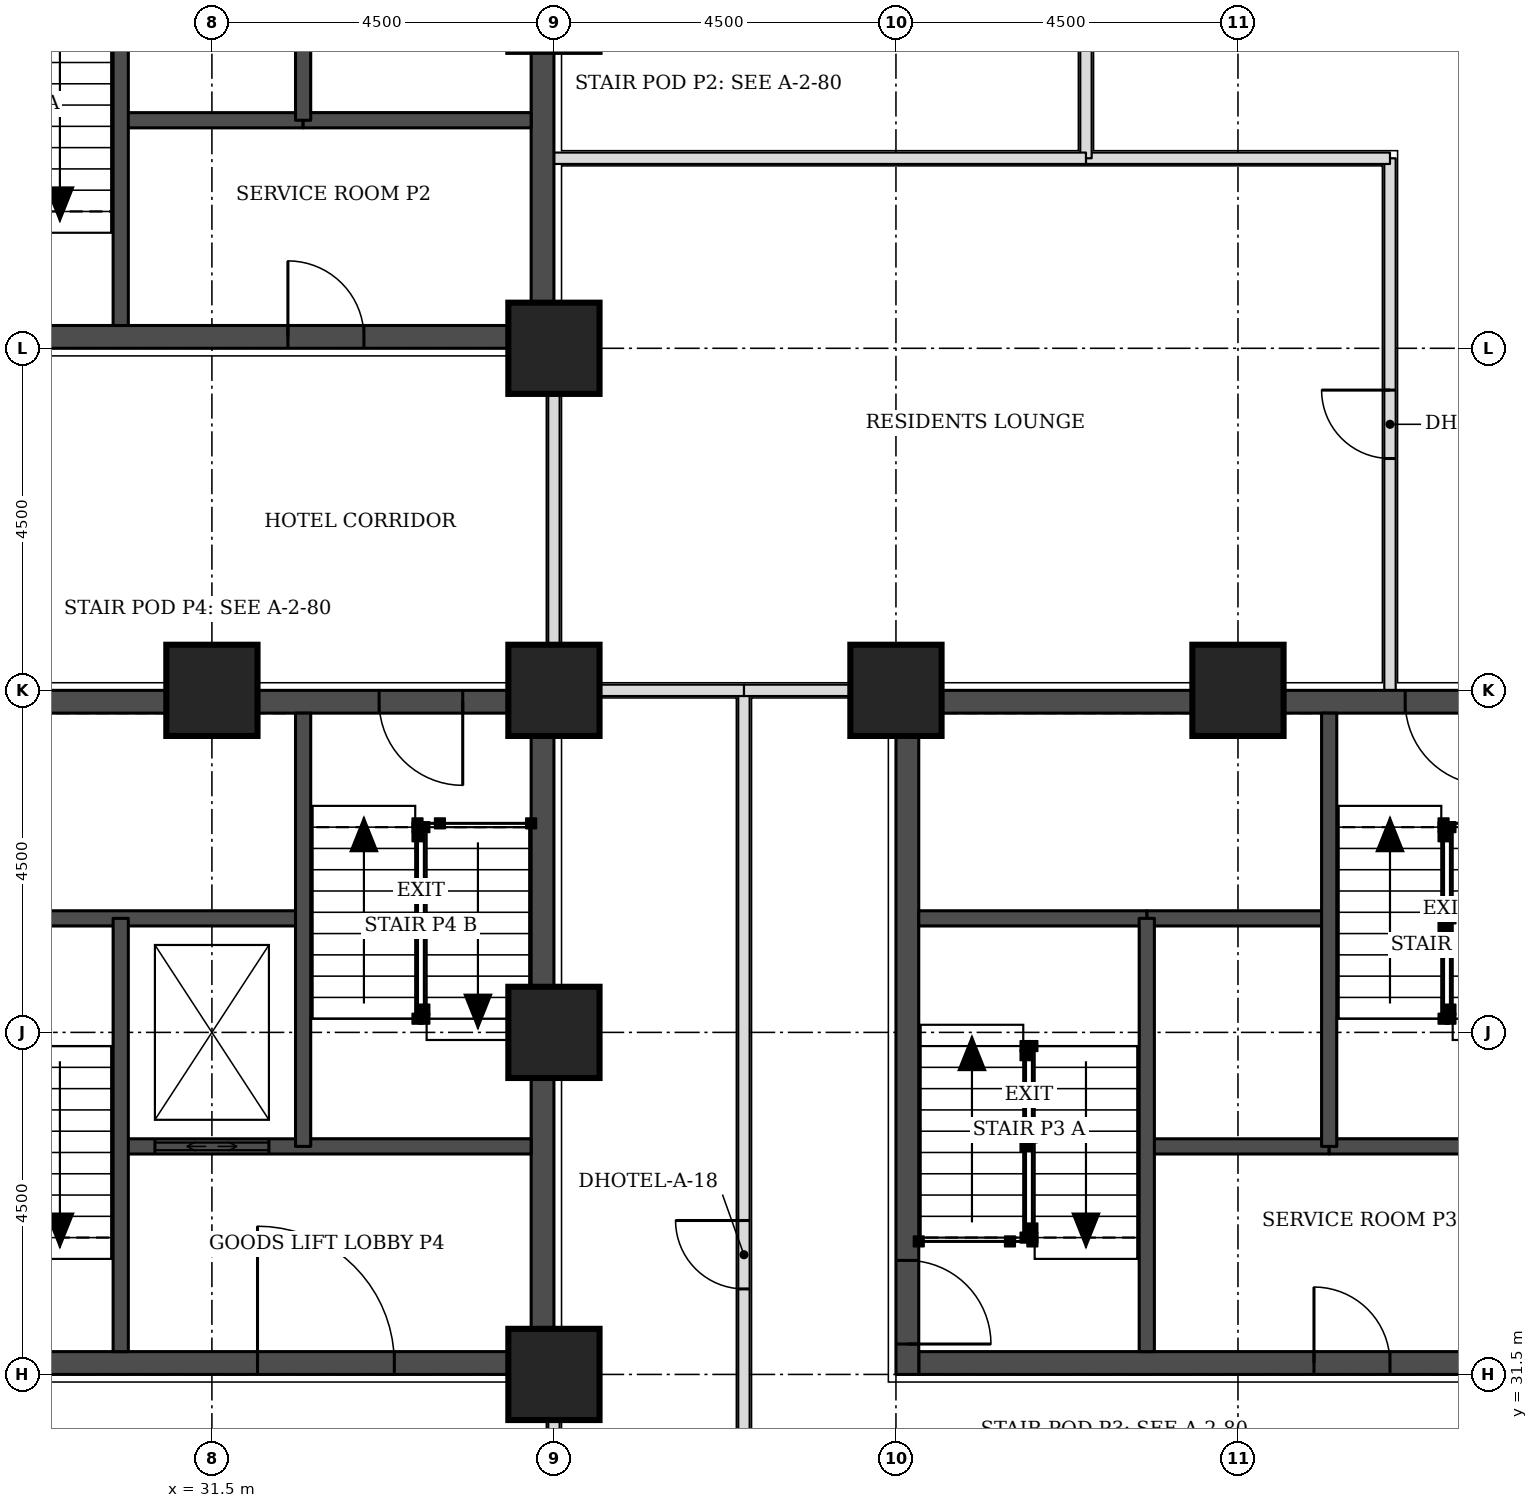
"""IFC4 building model, lengths in metres.
Left out: names, types, materials, properties, quantities, classifications, styles, units other than length and angle.
Written with IfcOpenShell. Run it as: python <this file> out.ifc"""

import sys

from ifc_helpers import new_model, si_unit, direction, frame, frame_2d, origin, origin_2d, place, context, subcontext, project, spatial, rectangle, extrude, element, fill, save


model = new_model("IFC4")
c1 = context("Model", 3, precision=1e-05, world=origin(), true_north=direction((0.0, 1.0)))
c2 = subcontext(c1, "Body", "Model", "MODEL_VIEW")
j1 = project(units=[si_unit("LENGTHUNIT", "METRE"), si_unit("PLANEANGLEUNIT", "RADIAN")], contexts=[c1])
p1 = place(None, origin())
s1 = spatial("IfcSite", under=j1, at=p1, CompositionType="ELEMENT")
p2 = place(p1, origin())
s2 = spatial("IfcBuilding", under=s1, at=p2, CompositionType="ELEMENT")
p3 = place(p2, frame((0.0, 0.0, 49.5)))
s3 = spatial("IfcBuildingStorey", under=s2, at=p3, CompositionType="ELEMENT", Elevation=49.5)
for number, where, z_axis, x_axis in (
    (1, (36.0, 31.5, 0.0), (0.0, 0.0, 1.0), (1.0, 0.0, 0.0)),
    (2, (36.0, 36.0, 0.0), (0.0, 0.0, 1.0), (1.0, 0.0, 0.0)),
    (3, (31.5, 40.5, 0.0), (0.0, 0.0, 1.0), (1.0, 0.0, 0.0)),
    (4, (36.0, 40.5, 0.0), (0.0, 0.0, 1.0), (1.0, 0.0, 0.0)),
    (5, (40.5, 40.5, 0.0), (0.0, 0.0, 1.0), (1.0, 0.0, 0.0)),
    (6, (45.0, 40.5, 0.0), (0.0, 0.0, 1.0), (1.0, 0.0, 0.0)),
    (7, (36.0, 45.0, 0.0), (0.0, 0.0, 1.0), (1.0, 0.0, 0.0)),
):
    element("IfcColumn", number, at=place(p3, frame(where, z_axis=z_axis, x_axis=x_axis)), inside=s3, PredefinedType="COLUMN", context=c2, shape_type="SweptSolid", body=[
        extrude(rectangle(XDim=1.2, YDim=1.2, at=origin_2d()), origin(), (0.0, 0.0, 1.0), 3.3),
    ])
p4 = place(p3, frame((27.3, 45.15, 0.0), z_axis=(0.0, 0.0, 1.0), x_axis=(1.0, 0.0, 0.0)))
e8 = element("IfcWall", 8, at=p4, inside=s3, PredefinedType="SHEAR", context=c2, shape_type="SweptSolid", body=[
    extrude(rectangle(XDim=8.4, YDim=0.3, at=frame_2d((4.2, 0.0))), origin(), (0.0, 0.0, 1.0), 3.3),
])
p5 = place(p4, frame((5.2, 0.0, 0.0)))
e9 = element("IfcOpeningElement", 9, at=p5, cuts=e8, PredefinedType="OPENING", context=c2, shape_type="SweptSolid", body=[
    extrude(rectangle(XDim=1.0, YDim=2.1, at=frame_2d((0.5, 1.05))), frame((0.0, 0.16, 0.0), z_axis=(0.0, -1.0, 0.0), x_axis=(1.0, 0.0, 0.0)), (0.0, 0.0, 1.0), 0.32),
])
p6 = place(p3, frame((35.85, 45.0, 0.0), z_axis=(0.0, 0.0, 1.0), x_axis=(0.0, 1.0, 0.0)))
e10 = element("IfcWall", 10, at=p6, inside=s3, PredefinedType="SHEAR", context=c2, shape_type="SweptSolid", body=[
    extrude(rectangle(XDim=9.0, YDim=0.3, at=frame_2d((4.5, 0.0))), origin(), (0.0, 0.0, 1.0), 3.3),
])
p7 = place(p3, frame((40.8, 31.65, 0.0), z_axis=(0.0, 0.0, 1.0), x_axis=(1.0, 0.0, 0.0)))
e11 = element("IfcWall", 11, at=p7, inside=s3, PredefinedType="SHEAR", context=c2, shape_type="SweptSolid", body=[
    extrude(rectangle(XDim=8.4, YDim=0.3, at=frame_2d((4.2, 0.0))), origin(), (0.0, 0.0, 1.0), 3.3),
])
p8 = place(p7, frame((5.2, 0.0, 0.0)))
e12 = element("IfcOpeningElement", 12, at=p8, cuts=e11, PredefinedType="OPENING", context=c2, shape_type="SweptSolid", body=[
    extrude(rectangle(XDim=1.0, YDim=2.1, at=frame_2d((0.5, 1.05))), frame((0.0, 0.16, 0.0), z_axis=(0.0, -1.0, 0.0), x_axis=(1.0, 0.0, 0.0)), (0.0, 0.0, 1.0), 0.32),
])
p9 = place(p3, frame((40.8, 40.35, 0.0), z_axis=(0.0, 0.0, 1.0), x_axis=(1.0, 0.0, 0.0)))
e13 = element("IfcWall", 13, at=p9, inside=s3, PredefinedType="SHEAR", context=c2, shape_type="SweptSolid", body=[
    extrude(rectangle(XDim=8.4, YDim=0.3, at=frame_2d((4.2, 0.0))), origin(), (0.0, 0.0, 1.0), 3.3),
])
p10 = place(p9, frame((6.4, 0.0, 0.0)))
e14 = element("IfcOpeningElement", 14, at=p10, cuts=e13, PredefinedType="OPENING", context=c2, shape_type="SweptSolid", body=[
    extrude(rectangle(XDim=1.1, YDim=2.1, at=frame_2d((0.55, 1.05))), frame((0.0, 0.16, 0.0), z_axis=(0.0, -1.0, 0.0), x_axis=(1.0, 0.0, 0.0)), (0.0, 0.0, 1.0), 0.32),
])
p11 = place(p3, frame((40.65, 31.5, 0.0), z_axis=(0.0, 0.0, 1.0), x_axis=(0.0, 1.0, 0.0)))
e15 = element("IfcWall", 15, at=p11, inside=s3, PredefinedType="SHEAR", context=c2, shape_type="SweptSolid", body=[
    extrude(rectangle(XDim=9.0, YDim=0.3, at=frame_2d((4.5, 0.0))), origin(), (0.0, 0.0, 1.0), 3.3),
])
p12 = place(p11, frame((0.4, 0.0, 0.0)))
e16 = element("IfcOpeningElement", 16, at=p12, cuts=e15, PredefinedType="OPENING", context=c2, shape_type="SweptSolid", body=[
    extrude(rectangle(XDim=1.1, YDim=2.1, at=frame_2d((0.55, 1.05))), frame((0.0, 0.16, 0.0), z_axis=(0.0, -1.0, 0.0), x_axis=(1.0, 0.0, 0.0)), (0.0, 0.0, 1.0), 0.32),
])
p13 = place(p3, frame((27.3, 31.65, 0.0), z_axis=(0.0, 0.0, 1.0), x_axis=(1.0, 0.0, 0.0)))
e17 = element("IfcWall", 17, at=p13, inside=s3, PredefinedType="SHEAR", context=c2, shape_type="SweptSolid", body=[
    extrude(rectangle(XDim=8.4, YDim=0.3, at=frame_2d((4.2, 0.0))), origin(), (0.0, 0.0, 1.0), 3.3),
])
p14 = place(p13, frame((4.8, 0.0, 0.0)))
e18 = element("IfcOpeningElement", 18, at=p14, cuts=e17, PredefinedType="OPENING", context=c2, shape_type="SweptSolid", body=[
    extrude(rectangle(XDim=1.8, YDim=2.1, at=frame_2d((0.9, 1.05))), frame((0.0, 0.16, 0.0), z_axis=(0.0, -1.0, 0.0), x_axis=(1.0, 0.0, 0.0)), (0.0, 0.0, 1.0), 0.32),
])
p15 = place(p3, frame((27.3, 40.35, 0.0), z_axis=(0.0, 0.0, 1.0), x_axis=(1.0, 0.0, 0.0)))
e19 = element("IfcWall", 19, at=p15, inside=s3, PredefinedType="SHEAR", context=c2, shape_type="SweptSolid", body=[
    extrude(rectangle(XDim=8.4, YDim=0.3, at=frame_2d((4.2, 0.0))), origin(), (0.0, 0.0, 1.0), 3.3),
])
p16 = place(p15, frame((6.4, 0.0, 0.0)))
e20 = element("IfcOpeningElement", 20, at=p16, cuts=e19, PredefinedType="OPENING", context=c2, shape_type="SweptSolid", body=[
    extrude(rectangle(XDim=1.1, YDim=2.1, at=frame_2d((0.55, 1.05))), frame((0.0, 0.16, 0.0), z_axis=(0.0, -1.0, 0.0), x_axis=(1.0, 0.0, 0.0)), (0.0, 0.0, 1.0), 0.32),
])
p17 = place(p3, frame((35.85, 31.5, 0.0), z_axis=(0.0, 0.0, 1.0), x_axis=(0.0, 1.0, 0.0)))
e21 = element("IfcWall", 21, at=p17, inside=s3, PredefinedType="SHEAR", context=c2, shape_type="SweptSolid", body=[
    extrude(rectangle(XDim=9.0, YDim=0.3, at=frame_2d((4.5, 0.0))), origin(), (0.0, 0.0, 1.0), 3.3),
])
p18 = place(p3, frame((38.5, 25.65, 0.0), z_axis=(0.0, 0.0, 1.0), x_axis=(0.0, 1.0, 0.0)))
e22 = element("IfcWall", 22, at=p18, inside=s3, PredefinedType="PARTITIONING", context=c2, shape_type="SweptSolid", body=[
    extrude(rectangle(XDim=14.85, YDim=0.15, at=frame_2d((7.425, 0.0))), origin(), (0.0, 0.0, 1.0), 3.08),
])
p19 = place(p18, frame((6.975, 0.0, 0.0)))
e23 = element("IfcOpeningElement", 23, at=p19, cuts=e22, PredefinedType="OPENING", context=c2, shape_type="SweptSolid", body=[
    extrude(rectangle(XDim=0.9, YDim=2.1, at=frame_2d((0.45, 1.05))), frame((0.0, 0.085, 0.0), z_axis=(0.0, -1.0, 0.0), x_axis=(1.0, 0.0, 0.0)), (0.0, 0.0, 1.0), 0.17),
])
for number, where, z_axis, x_axis in (
    (24, (36.0, 29.5, 0.0), (0.0, 0.0, 1.0), (0.0, 1.0, 0.0)),
    (25, (38.5, 40.5, 0.0), (0.0, 0.0, 1.0), (1.0, 0.0, 0.0)),
):
    element("IfcWall", number, at=place(p3, frame(where, z_axis=z_axis, x_axis=x_axis)), inside=s3, PredefinedType="PARTITIONING", context=c2, shape_type="SweptSolid", body=[
        extrude(rectangle(XDim=1.95, YDim=0.15, at=frame_2d((0.975, 0.0))), origin(), (0.0, 0.0, 1.0), 2.33),
    ])
p20 = place(p3, frame((36.0, 40.55, 0.0), z_axis=(0.0, 0.0, 1.0), x_axis=(0.0, 1.0, 0.0)))
e26 = element("IfcWall", 26, at=p20, inside=s3, PredefinedType="PARTITIONING", context=c2, shape_type="SweptSolid", body=[
    extrude(rectangle(XDim=4.4, YDim=0.15, at=frame_2d((2.2, 0.0))), origin(), (0.0, 0.0, 1.0), 2.33),
])
p21 = place(p3, frame((47.0, 40.5, 0.0), z_axis=(0.0, 0.0, 1.0), x_axis=(0.0, 1.0, 0.0)))
e27 = element("IfcWall", 27, at=p21, inside=s3, PredefinedType="PARTITIONING", context=c2, shape_type="SweptSolid", body=[
    extrude(rectangle(XDim=7.0, YDim=0.15, at=frame_2d((3.5, 0.0))), origin(), (0.0, 0.0, 1.0), 3.08),
])
p22 = place(p21, frame((3.05, 0.0, 0.0)))
e28 = element("IfcOpeningElement", 28, at=p22, cuts=e27, PredefinedType="OPENING", context=c2, shape_type="SweptSolid", body=[
    extrude(rectangle(XDim=0.9, YDim=2.1, at=frame_2d((0.45, 1.05))), frame((0.0, 0.085, 0.0), z_axis=(0.0, -1.0, 0.0), x_axis=(1.0, 0.0, 0.0)), (0.0, 0.0, 1.0), 0.17),
])
p23 = place(p3, frame((43.0, 47.5, 0.0), z_axis=(0.0, 0.0, 1.0), x_axis=(1.0, 0.0, 0.0)))
e29 = element("IfcWall", 29, at=p23, inside=s3, PredefinedType="PARTITIONING", context=c2, shape_type="SweptSolid", body=[
    extrude(rectangle(XDim=4.0, YDim=0.15, at=frame_2d((2.0, 0.0))), origin(), (0.0, 0.0, 1.0), 3.08),
])
p24 = place(p3, frame((43.0, 47.5, 0.0), z_axis=(0.0, 0.0, 1.0), x_axis=(0.0, 1.0, 0.0)))
e30 = element("IfcWall", 30, at=p24, inside=s3, PredefinedType="PARTITIONING", context=c2, shape_type="SweptSolid", body=[
    extrude(rectangle(XDim=6.5, YDim=0.15, at=frame_2d((3.25, 0.0))), origin(), (0.0, 0.0, 1.0), 3.08),
])
p25 = place(p3, frame((36.05, 40.5, 0.0), z_axis=(0.0, 0.0, 1.0), x_axis=(1.0, 0.0, 0.0)))
e31 = element("IfcWall", 31, at=p25, inside=s3, PredefinedType="PARTITIONING", context=c2, shape_type="SweptSolid", body=[
    extrude(rectangle(XDim=2.45, YDim=0.15, at=frame_2d((1.225, 0.0))), origin(), (0.0, 0.0, 1.0), 2.33),
])
p26 = place(p3, frame((36.0, 47.5, 0.0), z_axis=(0.0, 0.0, 1.0), x_axis=(1.0, 0.0, 0.0)))
e32 = element("IfcWall", 32, at=p26, inside=s3, PredefinedType="PARTITIONING", context=c2, shape_type="SweptSolid", body=[
    extrude(rectangle(XDim=7.0, YDim=0.15, at=frame_2d((3.5, 0.0))), origin(), (0.0, 0.0, 1.0), 3.08),
])
p27 = place(p3, frame((30.3, 48.0, 0.0), z_axis=(0.0, 0.0, 1.0), x_axis=(1.0, 0.0, 0.0)))
e33 = element("IfcWall", 33, at=p27, inside=s3, PredefinedType="SOLIDWALL", context=c2, shape_type="SweptSolid", body=[
    extrude(rectangle(XDim=2.4, YDim=0.2, at=frame_2d((1.2, 0.0))), origin(), (0.0, 0.0, 1.0), 3.08),
])
p28 = place(p3, frame((32.7, 48.0, 0.0), z_axis=(0.0, 0.0, 1.0), x_axis=(1.0, 0.0, 0.0)))
e34 = element("IfcWall", 34, at=p28, inside=s3, PredefinedType="SOLIDWALL", context=c2, shape_type="SweptSolid", body=[
    extrude(rectangle(XDim=3.0, YDim=0.2, at=frame_2d((1.5, 0.0))), origin(), (0.0, 0.0, 1.0), 3.08),
])
for number, where, z_axis, x_axis in (
    (35, (30.3, 45.3, 0.0), (0.0, 0.0, 1.0), (0.0, 1.0, 0.0)),
    (36, (32.7, 48.0, 0.0), (0.0, 0.0, 1.0), (0.0, 1.0, 0.0)),
):
    element("IfcWall", number, at=place(p3, frame(where, z_axis=z_axis, x_axis=x_axis)), inside=s3, PredefinedType="SOLIDWALL", context=c2, shape_type="SweptSolid", body=[
        extrude(rectangle(XDim=5.7, YDim=0.2, at=frame_2d((2.85, 0.0))), origin(), (0.0, 0.0, 1.0), 3.08),
    ])
p29 = place(p3, frame((43.8, 34.5, 0.0), z_axis=(0.0, 0.0, 1.0), x_axis=(1.0, 0.0, 0.0)))
e37 = element("IfcWall", 37, at=p29, inside=s3, PredefinedType="SOLIDWALL", context=c2, shape_type="SweptSolid", body=[
    extrude(rectangle(XDim=2.4, YDim=0.2, at=frame_2d((1.2, 0.0))), origin(), (0.0, 0.0, 1.0), 3.08),
])
p30 = place(p3, frame((46.2, 34.5, 0.0), z_axis=(0.0, 0.0, 1.0), x_axis=(1.0, 0.0, 0.0)))
e38 = element("IfcWall", 38, at=p30, inside=s3, PredefinedType="SOLIDWALL", context=c2, shape_type="SweptSolid", body=[
    extrude(rectangle(XDim=3.0, YDim=0.2, at=frame_2d((1.5, 0.0))), origin(), (0.0, 0.0, 1.0), 3.08),
])
p31 = place(p3, frame((43.8, 37.5, 0.0), z_axis=(0.0, 0.0, 1.0), x_axis=(1.0, 0.0, 0.0)))
e39 = element("IfcWall", 39, at=p31, inside=s3, PredefinedType="SOLIDWALL", context=c2, shape_type="SweptSolid", body=[
    extrude(rectangle(XDim=2.4, YDim=0.2, at=frame_2d((1.2, 0.0))), origin(), (0.0, 0.0, 1.0), 3.3),
])
p32 = place(p3, frame((40.8, 37.5, 0.0), z_axis=(0.0, 0.0, 1.0), x_axis=(1.0, 0.0, 0.0)))
e40 = element("IfcWall", 40, at=p32, inside=s3, PredefinedType="SOLIDWALL", context=c2, shape_type="SweptSolid", body=[
    extrude(rectangle(XDim=3.0, YDim=0.2, at=frame_2d((1.5, 0.0))), origin(), (0.0, 0.0, 1.0), 3.08),
])
for number, where, z_axis, x_axis in (
    (41, (43.8, 31.8, 0.0), (0.0, 0.0, 1.0), (0.0, 1.0, 0.0)),
    (42, (46.2, 34.5, 0.0), (0.0, 0.0, 1.0), (0.0, 1.0, 0.0)),
):
    element("IfcWall", number, at=place(p3, frame(where, z_axis=z_axis, x_axis=x_axis)), inside=s3, PredefinedType="SOLIDWALL", context=c2, shape_type="SweptSolid", body=[
        extrude(rectangle(XDim=5.7, YDim=0.2, at=frame_2d((2.85, 0.0))), origin(), (0.0, 0.0, 1.0), 3.08),
    ])
p33 = place(p3, frame((30.3, 34.5, 0.0), z_axis=(0.0, 0.0, 1.0), x_axis=(1.0, 0.0, 0.0)))
e43 = element("IfcWall", 43, at=p33, inside=s3, PredefinedType="SOLIDWALL", context=c2, shape_type="SweptSolid", body=[
    extrude(rectangle(XDim=5.4, YDim=0.2, at=frame_2d((2.7, 0.0))), origin(), (0.0, 0.0, 1.0), 3.08),
])
p34 = place(p33, frame((0.45, 0.0, 0.0)))
e44 = element("IfcOpeningElement", 44, at=p34, cuts=e43, PredefinedType="OPENING", context=c2, shape_type="SweptSolid", body=[
    extrude(rectangle(XDim=1.5, YDim=2.1, at=frame_2d((0.75, 1.05))), frame((0.0, 0.11, 0.0), z_axis=(0.0, -1.0, 0.0), x_axis=(1.0, 0.0, 0.0)), (0.0, 0.0, 1.0), 0.22),
])
p35 = place(p3, frame((27.3, 37.5, 0.0), z_axis=(0.0, 0.0, 1.0), x_axis=(1.0, 0.0, 0.0)))
e45 = element("IfcWall", 45, at=p35, inside=s3, PredefinedType="SOLIDWALL", context=c2, shape_type="SweptSolid", body=[
    extrude(rectangle(XDim=5.4, YDim=0.2, at=frame_2d((2.7, 0.0))), origin(), (0.0, 0.0, 1.0), 3.08),
])
for number, where, z_axis, x_axis in (
    (46, (30.3, 31.8, 0.0), (0.0, 0.0, 1.0), (0.0, 1.0, 0.0)),
    (47, (32.7, 34.5, 0.0), (0.0, 0.0, 1.0), (0.0, 1.0, 0.0)),
):
    element("IfcWall", number, at=place(p3, frame(where, z_axis=z_axis, x_axis=x_axis)), inside=s3, PredefinedType="SOLIDWALL", context=c2, shape_type="SweptSolid", body=[
        extrude(rectangle(XDim=5.7, YDim=0.2, at=frame_2d((2.85, 0.0))), origin(), (0.0, 0.0, 1.0), 3.08),
    ])
p36 = place(p19, origin())
e48 = element("IfcDoor", 48, at=p36, inside=s3, OperationType="SINGLE_SWING_RIGHT", PredefinedType="DOOR", context=c2, shape_type="SweptSolid", body=[
    extrude(rectangle(XDim=0.9, YDim=2.1, at=frame_2d((0.45, 1.05))), frame((0.0, 0.025, 0.0), z_axis=(0.0, -1.0, 0.0), x_axis=(1.0, 0.0, 0.0)), (0.0, 0.0, 1.0), 0.05),
])
fill(e23, e48)
p37 = place(p22, origin())
e49 = element("IfcDoor", 49, at=p37, inside=s3, OperationType="SINGLE_SWING_RIGHT", PredefinedType="DOOR", context=c2, shape_type="SweptSolid", body=[
    extrude(rectangle(XDim=0.9, YDim=2.1, at=frame_2d((0.45, 1.05))), frame((0.0, 0.025, 0.0), z_axis=(0.0, -1.0, 0.0), x_axis=(1.0, 0.0, 0.0)), (0.0, 0.0, 1.0), 0.05),
])
fill(e28, e49)
p38 = place(p5, origin())
e50 = element("IfcDoor", 50, at=p38, inside=s3, OperationType="SINGLE_SWING_LEFT", PredefinedType="DOOR", context=c2, shape_type="SweptSolid", body=[
    extrude(rectangle(XDim=1.0, YDim=2.1, at=frame_2d((0.5, 1.05))), frame((0.0, 0.025, 0.0), z_axis=(0.0, -1.0, 0.0), x_axis=(1.0, 0.0, 0.0)), (0.0, 0.0, 1.0), 0.05),
])
fill(e9, e50)
p39 = place(p12, frame((1.1, 0.0, 0.0), z_axis=(0.0, 0.0, 1.0), x_axis=(-1.0, 0.0, 0.0)))
e51 = element("IfcDoor", 51, at=p39, inside=s3, OperationType="SINGLE_SWING_RIGHT", PredefinedType="DOOR", context=c2, shape_type="SweptSolid", body=[
    extrude(rectangle(XDim=1.1, YDim=2.1, at=frame_2d((0.55, 1.05))), frame((0.0, 0.025, 0.0), z_axis=(0.0, -1.0, 0.0), x_axis=(1.0, 0.0, 0.0)), (0.0, 0.0, 1.0), 0.05),
])
fill(e16, e51)
p40 = place(p10, frame((1.1, 0.0, 0.0), z_axis=(0.0, 0.0, 1.0), x_axis=(-1.0, 0.0, 0.0)))
e52 = element("IfcDoor", 52, at=p40, inside=s3, OperationType="SINGLE_SWING_LEFT", PredefinedType="DOOR", context=c2, shape_type="SweptSolid", body=[
    extrude(rectangle(XDim=1.1, YDim=2.1, at=frame_2d((0.55, 1.05))), frame((0.0, 0.025, 0.0), z_axis=(0.0, -1.0, 0.0), x_axis=(1.0, 0.0, 0.0)), (0.0, 0.0, 1.0), 0.05),
])
fill(e14, e52)
p41 = place(p8, origin())
e53 = element("IfcDoor", 53, at=p41, inside=s3, OperationType="SINGLE_SWING_LEFT", PredefinedType="DOOR", context=c2, shape_type="SweptSolid", body=[
    extrude(rectangle(XDim=1.0, YDim=2.1, at=frame_2d((0.5, 1.05))), frame((0.0, 0.025, 0.0), z_axis=(0.0, -1.0, 0.0), x_axis=(1.0, 0.0, 0.0)), (0.0, 0.0, 1.0), 0.05),
])
fill(e12, e53)
p42 = place(p16, frame((1.1, 0.0, 0.0), z_axis=(0.0, 0.0, 1.0), x_axis=(-1.0, 0.0, 0.0)))
e54 = element("IfcDoor", 54, at=p42, inside=s3, OperationType="SINGLE_SWING_LEFT", PredefinedType="DOOR", context=c2, shape_type="SweptSolid", body=[
    extrude(rectangle(XDim=1.1, YDim=2.1, at=frame_2d((0.55, 1.05))), frame((0.0, 0.025, 0.0), z_axis=(0.0, -1.0, 0.0), x_axis=(1.0, 0.0, 0.0)), (0.0, 0.0, 1.0), 0.05),
])
fill(e20, e54)
p43 = place(p34, origin())
e55 = element("IfcDoor", 55, at=p43, inside=s3, OperationType="DOUBLE_DOOR_SLIDING", PredefinedType="DOOR", context=c2, shape_type="SweptSolid", body=[
    extrude(rectangle(XDim=1.5, YDim=2.1, at=frame_2d((0.75, 1.05))), frame((0.0, 0.025, 0.0), z_axis=(0.0, -1.0, 0.0), x_axis=(1.0, 0.0, 0.0)), (0.0, 0.0, 1.0), 0.05),
])
fill(e44, e55)
p44 = place(p14, origin())
e56 = element("IfcDoor", 56, at=p44, inside=s3, OperationType="SINGLE_SWING_LEFT", PredefinedType="DOOR", context=c2, shape_type="SweptSolid", body=[
    extrude(rectangle(XDim=1.8, YDim=2.1, at=frame_2d((0.9, 1.05))), frame((0.0, 0.025, 0.0), z_axis=(0.0, -1.0, 0.0), x_axis=(1.0, 0.0, 0.0)), (0.0, 0.0, 1.0), 0.05),
])
fill(e18, e56)
save(model, sys.argv[1])
